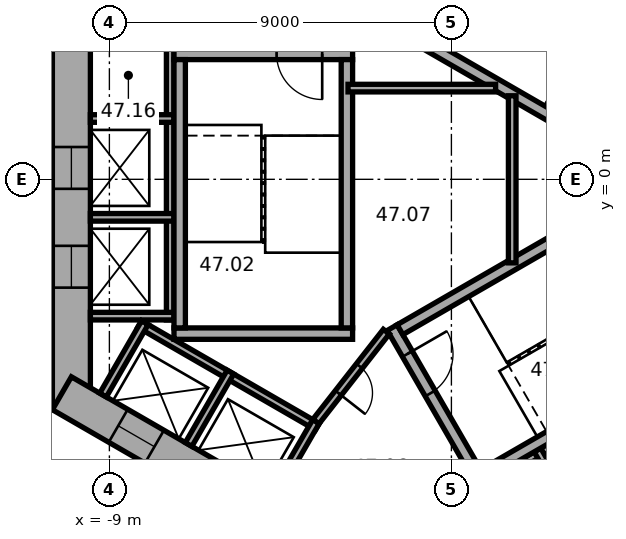
"""IFC4 building model, lengths in metres.
Left out: names, types, materials, properties, quantities, classifications, styles, units other than length and angle.
Written with IfcOpenShell. Run it as: python <this file> out.ifc"""

import sys

from ifc_helpers import new_model, si_unit, direction, frame, frame_2d, origin, place, context, subcontext, project, spatial, rectangle, extrude, element, fill, save


model = new_model("IFC4")
c1 = context("Model", 3, precision=1e-05, world=origin(), true_north=direction((0.0, 1.0)))
c2 = subcontext(c1, "Body", "Model", "MODEL_VIEW")
j1 = project(units=[si_unit("LENGTHUNIT", "METRE"), si_unit("PLANEANGLEUNIT", "RADIAN")], contexts=[c1])
p1 = place(None, origin())
s1 = spatial("IfcSite", under=j1, at=p1, CompositionType="ELEMENT")
p2 = place(p1, origin())
s2 = spatial("IfcBuilding", under=s1, at=p2, CompositionType="ELEMENT")
p3 = place(p2, frame((0.0, 0.0, 191.0)))
s3 = spatial("IfcBuildingStorey", under=s2, at=p3, CompositionType="ELEMENT", Elevation=191.0)
p4 = place(p3, frame((-10.0, 6.062, 0.0), z_axis=(0.0, 0.0, 1.0), x_axis=(0.0, -1.0, 0.0)))
e1 = element("IfcWall", 1, at=p4, inside=s3, PredefinedType="SHEAR", context=c2, shape_type="SweptSolid", body=[
    extrude(rectangle(XDim=12.125, YDim=1.0, at=frame_2d((6.062, 0.0))), origin(), (0.0, 0.0, 1.0), 3.7),
])
p5 = place(p4, frame((5.212, 0.0, 0.0)))
e2 = element("IfcOpeningElement", 2, at=p5, cuts=e1, PredefinedType="OPENING", context=c2, shape_type="SweptSolid", body=[
    extrude(rectangle(XDim=1.1, YDim=2.1, at=frame_2d((0.55, 1.05))), frame((0.0, 0.51, 0.0), z_axis=(0.0, -1.0, 0.0), x_axis=(1.0, 0.0, 0.0)), (0.0, 0.0, 1.0), 1.02),
])
p6 = place(p4, frame((7.812, 0.0, 0.0)))
e3 = element("IfcOpeningElement", 3, at=p6, cuts=e1, PredefinedType="OPENING", context=c2, shape_type="SweptSolid", body=[
    extrude(rectangle(XDim=1.1, YDim=2.1, at=frame_2d((0.55, 1.05))), frame((0.0, 0.51, 0.0), z_axis=(0.0, -1.0, 0.0), x_axis=(1.0, 0.0, 0.0)), (0.0, 0.0, 1.0), 1.02),
])
p7 = place(p3, frame((-10.25, -5.629, 0.0), z_axis=(0.0, 0.0, 1.0), x_axis=(0.866022616891, -0.50000482701, 0.0)))
e4 = element("IfcWall", 4, at=p7, inside=s3, PredefinedType="SHEAR", context=c2, shape_type="SweptSolid", body=[
    extrude(rectangle(XDim=12.125, YDim=1.0, at=frame_2d((6.062, 0.0))), origin(), (0.0, 0.0, 1.0), 3.7),
])
p8 = place(p7, frame((6.262, 0.0, 0.0)))
e5 = element("IfcOpeningElement", 5, at=p8, cuts=e4, PredefinedType="OPENING", context=c2, shape_type="SweptSolid", body=[
    extrude(rectangle(XDim=1.5, YDim=2.1, at=frame_2d((0.75, 1.05))), frame((0.0, 0.51, 0.0), z_axis=(0.0, -1.0, 0.0), x_axis=(1.0, 0.0, 0.0)), (0.0, 0.0, 1.0), 1.02),
])
p9 = place(p7, frame((1.712, 0.0, 0.0)))
e6 = element("IfcOpeningElement", 6, at=p9, cuts=e4, PredefinedType="OPENING", context=c2, shape_type="SweptSolid", body=[
    extrude(rectangle(XDim=1.1, YDim=2.1, at=frame_2d((0.55, 1.05))), frame((0.0, 0.51, 0.0), z_axis=(0.0, -1.0, 0.0), x_axis=(1.0, 0.0, 0.0)), (0.0, 0.0, 1.0), 1.02),
])
p10 = place(p7, frame((4.312, 0.0, 0.0)))
e7 = element("IfcOpeningElement", 7, at=p10, cuts=e4, PredefinedType="OPENING", context=c2, shape_type="SweptSolid", body=[
    extrude(rectangle(XDim=1.1, YDim=2.1, at=frame_2d((0.55, 1.05))), frame((0.0, 0.51, 0.0), z_axis=(0.0, -1.0, 0.0), x_axis=(1.0, 0.0, 0.0)), (0.0, 0.0, 1.0), 1.02),
])
p11 = place(p3, frame((-0.25, -11.691, 0.0), z_axis=(0.0, 0.0, 1.0), x_axis=(0.866022616891, 0.50000482701, 0.0)))
e8 = element("IfcWall", 8, at=p11, inside=s3, PredefinedType="SHEAR", context=c2, shape_type="SweptSolid", body=[
    extrude(rectangle(XDim=12.125, YDim=1.0, at=frame_2d((6.062, 0.0))), origin(), (0.0, 0.0, 1.0), 3.7),
])
p12 = place(p11, frame((2.612, 0.0, 0.0)))
e9 = element("IfcOpeningElement", 9, at=p12, cuts=e8, PredefinedType="OPENING", context=c2, shape_type="SweptSolid", body=[
    extrude(rectangle(XDim=1.1, YDim=2.1, at=frame_2d((0.55, 1.05))), frame((0.0, 0.51, 0.0), z_axis=(0.0, -1.0, 0.0), x_axis=(1.0, 0.0, 0.0)), (0.0, 0.0, 1.0), 1.02),
])
p13 = place(p11, frame((5.212, 0.0, 0.0)))
e10 = element("IfcOpeningElement", 10, at=p13, cuts=e8, PredefinedType="OPENING", context=c2, shape_type="SweptSolid", body=[
    extrude(rectangle(XDim=1.1, YDim=2.1, at=frame_2d((0.55, 1.05))), frame((0.0, 0.51, 0.0), z_axis=(0.0, -1.0, 0.0), x_axis=(1.0, 0.0, 0.0)), (0.0, 0.0, 1.0), 1.02),
])
p14 = place(p11, frame((7.812, 0.0, 0.0)))
e11 = element("IfcOpeningElement", 11, at=p14, cuts=e8, PredefinedType="OPENING", context=c2, shape_type="SweptSolid", body=[
    extrude(rectangle(XDim=1.1, YDim=2.1, at=frame_2d((0.55, 1.05))), frame((0.0, 0.51, 0.0), z_axis=(0.0, -1.0, 0.0), x_axis=(1.0, 0.0, 0.0)), (0.0, 0.0, 1.0), 1.02),
])
p15 = place(p3, frame((-7.4, 4.3, 0.0), z_axis=(0.0, 0.0, 1.0), x_axis=(0.0, -1.0, 0.0)))
e12 = element("IfcWall", 12, at=p15, inside=s3, PredefinedType="PARTITIONING", context=c2, shape_type="SweptSolid", body=[
    extrude(rectangle(XDim=8.0, YDim=0.2, at=frame_2d((4.0, 0.0))), origin(), (0.0, 0.0, 1.0), 3.42),
])
for number, where, z_axis, x_axis in (
    (13, (-7.3, 1.6, 0.0), (0.0, 0.0, 1.0), (-1.0, 0.0, 0.0)),
    (14, (-7.3, -1.0, 0.0), (0.0, 0.0, 1.0), (-1.0, 0.0, 0.0)),
    (15, (-7.3, -3.6, 0.0), (0.0, 0.0, 1.0), (-1.0, 0.0, 0.0)),
):
    element("IfcWall", number, at=place(p3, frame(where, z_axis=z_axis, x_axis=x_axis)), inside=s3, PredefinedType="PARTITIONING", context=c2, shape_type="SweptSolid", body=[
        extrude(rectangle(XDim=2.2, YDim=0.2, at=frame_2d((1.1, 0.0))), origin(), (0.0, 0.0, 1.0), 3.42),
    ])
p16 = place(p3, frame((-8.203, -3.809, 0.0), z_axis=(0.0, 0.0, 1.0), x_axis=(0.866028230842, -0.499995103361, 0.0)))
e16 = element("IfcWall", 16, at=p16, inside=s3, PredefinedType="PARTITIONING", context=c2, shape_type="SweptSolid", body=[
    extrude(rectangle(XDim=5.4, YDim=0.2, at=frame_2d((2.7, 0.0))), origin(), (0.0, 0.0, 1.0), 3.42),
])
for number, where, z_axis, x_axis in (
    (17, (-8.067, -3.772, 0.0), (0.0, 0.0, 1.0), (-0.5, -0.866, 0.0)),
    (18, (-5.815, -5.072, 0.0), (0.0, 0.0, 1.0), (-0.5, -0.866, 0.0)),
):
    element("IfcWall", number, at=place(p3, frame(where, z_axis=z_axis, x_axis=x_axis)), inside=s3, PredefinedType="PARTITIONING", context=c2, shape_type="SweptSolid", body=[
        extrude(rectangle(XDim=2.2, YDim=0.2, at=frame_2d((1.1, 0.0))), origin(), (0.0, 0.0, 1.0), 3.42),
    ])
p17 = place(p3, frame((-3.563, -6.372, 0.0), z_axis=(0.0, 0.0, 1.0), x_axis=(-0.499994660107, -0.866028486751, 0.0)))
e19 = element("IfcWall", 19, at=p17, inside=s3, PredefinedType="PARTITIONING", context=c2, shape_type="SweptSolid", body=[
    extrude(rectangle(XDim=2.2, YDim=0.2, at=frame_2d((1.1, 0.0))), origin(), (0.0, 0.0, 1.0), 3.42),
])
p18 = place(p3, frame((-0.024, -8.559, 0.0), z_axis=(0.0, 0.0, 1.0), x_axis=(0.866026010844, 0.49999894854, 0.0)))
e20 = element("IfcWall", 20, at=p18, inside=s3, PredefinedType="PARTITIONING", context=c2, shape_type="SweptSolid", body=[
    extrude(rectangle(XDim=8.0, YDim=0.2, at=frame_2d((4.0, 0.0))), origin(), (0.0, 0.0, 1.0), 3.42),
])
p19 = place(p3, frame((2.264, -7.122, 0.0), z_axis=(0.0, 0.0, 1.0), x_axis=(0.500077893725, -0.86598042715, 0.0)))
e21 = element("IfcWall", 21, at=p19, inside=s3, PredefinedType="PARTITIONING", context=c2, shape_type="SweptSolid", body=[
    extrude(rectangle(XDim=2.2, YDim=0.2, at=frame_2d((1.1, 0.0))), origin(), (0.0, 0.0, 1.0), 3.42),
])
p20 = place(p3, frame((4.103, 0.807, 0.0), z_axis=(0.0, 0.0, 1.0), x_axis=(-0.866027801685, 0.499995846692, 0.0)))
e22 = element("IfcWall", 22, at=p20, inside=s3, PredefinedType="SHEAR", context=c2, shape_type="SweptSolid", body=[
    extrude(rectangle(XDim=7.06, YDim=0.3, at=frame_2d((3.53, 0.0))), origin(), (0.0, 0.0, 1.0), 3.42),
])
p21 = place(p3, frame((-2.6, 3.3, 0.0), z_axis=(0.0, 0.0, 1.0), x_axis=(-1.0, 0.0, 0.0)))
e23 = element("IfcWall", 23, at=p21, inside=s3, PredefinedType="SHEAR", context=c2, shape_type="SweptSolid", body=[
    extrude(rectangle(XDim=4.7, YDim=0.3, at=frame_2d((2.35, 0.0))), origin(), (0.0, 0.0, 1.0), 3.42),
])
p22 = place(p21, frame((0.8, 0.0, 0.0)))
e24 = element("IfcOpeningElement", 24, at=p22, cuts=e23, PredefinedType="OPENING", context=c2, shape_type="SweptSolid", body=[
    extrude(rectangle(XDim=1.2, YDim=2.1, at=frame_2d((0.6, 1.05))), frame((0.0, 0.16, 0.0), z_axis=(0.0, -1.0, 0.0), x_axis=(1.0, 0.0, 0.0)), (0.0, 0.0, 1.0), 0.32),
])
p23 = place(p3, frame((-2.6, -4.06, 0.0), z_axis=(0.0, 0.0, 1.0), x_axis=(-1.0, 0.0, 0.0)))
e25 = element("IfcWall", 25, at=p23, inside=s3, PredefinedType="SHEAR", context=c2, shape_type="SweptSolid", body=[
    extrude(rectangle(XDim=4.7, YDim=0.3, at=frame_2d((2.35, 0.0))), origin(), (0.0, 0.0, 1.0), 3.42),
])
for number, where, z_axis, x_axis in (
    (26, (-2.75, 3.15, 0.0), (0.0, 0.0, 1.0), (0.0, -1.0, 0.0)),
    (27, (-7.15, 3.15, 0.0), (0.0, 0.0, 1.0), (0.0, -1.0, 0.0)),
):
    element("IfcWall", number, at=place(p3, frame(where, z_axis=z_axis, x_axis=x_axis)), inside=s3, PredefinedType="SHEAR", context=c2, shape_type="SweptSolid", body=[
        extrude(rectangle(XDim=7.06, YDim=0.3, at=frame_2d((3.53, 0.0))), origin(), (0.0, 0.0, 1.0), 3.42),
    ])
p24 = place(p3, frame((-1.558, -3.902, 0.0), z_axis=(0.0, 0.0, 1.0), x_axis=(0.499977259774, -0.866038532462, 0.0)))
e28 = element("IfcWall", 28, at=p24, inside=s3, PredefinedType="SHEAR", context=c2, shape_type="SweptSolid", body=[
    extrude(rectangle(XDim=4.7, YDim=0.3, at=frame_2d((2.35, 0.0))), origin(), (0.0, 0.0, 1.0), 3.42),
])
p25 = place(p24, frame((0.8, 0.0, 0.0)))
e29 = element("IfcOpeningElement", 29, at=p25, cuts=e28, PredefinedType="OPENING", context=c2, shape_type="SweptSolid", body=[
    extrude(rectangle(XDim=1.2, YDim=2.1, at=frame_2d((0.6, 1.05))), frame((0.0, 0.16, 0.0), z_axis=(0.0, -1.0, 0.0), x_axis=(1.0, 0.0, 0.0)), (0.0, 0.0, 1.0), 0.32),
])
for number, where, z_axis, x_axis in (
    (30, (-1.353, -3.957, 0.0), (0.0, 0.0, 1.0), (0.866, 0.5, 0.0)),
    (31, (0.847, -7.767, 0.0), (0.0, 0.0, 1.0), (0.866, 0.5, 0.0)),
):
    element("IfcWall", number, at=place(p3, frame(where, z_axis=z_axis, x_axis=x_axis)), inside=s3, PredefinedType="SHEAR", context=c2, shape_type="SweptSolid", body=[
        extrude(rectangle(XDim=7.06, YDim=0.3, at=frame_2d((3.53, 0.0))), origin(), (0.0, 0.0, 1.0), 3.42),
    ])
p26 = place(p3, frame((-1.712, -4.008, 0.0), z_axis=(0.0, 0.0, 1.0), x_axis=(-0.616549420702, -0.787316208287, 0.0)))
e32 = element("IfcWall", 32, at=p26, inside=s3, PredefinedType="PARTITIONING", context=c2, shape_type="SweptSolid", body=[
    extrude(rectangle(XDim=3.002, YDim=0.2, at=frame_2d((1.501, 0.0))), origin(), (0.0, 0.0, 1.0), 3.42),
])
p27 = place(p26, frame((1.15, 0.0, 0.0)))
e33 = element("IfcOpeningElement", 33, at=p27, cuts=e32, PredefinedType="OPENING", context=c2, shape_type="SweptSolid", body=[
    extrude(rectangle(XDim=0.9, YDim=2.1, at=frame_2d((0.45, 1.05))), frame((0.0, 0.11, 0.0), z_axis=(0.0, -1.0, 0.0), x_axis=(1.0, 0.0, 0.0)), (0.0, 0.0, 1.0), 0.22),
])
p28 = place(p3, frame((-2.72, 2.4, 0.0), z_axis=(0.0, 0.0, 1.0), x_axis=(1.0, 0.0, 0.0)))
e34 = element("IfcWall", 34, at=p28, inside=s3, PredefinedType="PARTITIONING", context=c2, shape_type="SweptSolid", body=[
    extrude(rectangle(XDim=3.883, YDim=0.2, at=frame_2d((1.941, 0.0))), origin(), (0.0, 0.0, 1.0), 3.42),
])
p29 = place(p3, frame((1.6, -2.198, 0.0), z_axis=(0.0, 0.0, 1.0), x_axis=(0.0, 1.0, 0.0)))
e35 = element("IfcWall", 35, at=p29, inside=s3, PredefinedType="PARTITIONING", context=c2, shape_type="SweptSolid", body=[
    extrude(rectangle(XDim=4.397, YDim=0.2, at=frame_2d((2.198, 0.0))), origin(), (0.0, 0.0, 1.0), 3.42),
])
p30 = place(p22, origin())
e36 = element("IfcDoor", 36, at=p30, inside=s3, OperationType="SINGLE_SWING_RIGHT", PredefinedType="DOOR", context=c2, shape_type="SweptSolid", body=[
    extrude(rectangle(XDim=1.2, YDim=2.1, at=frame_2d((0.6, 1.05))), frame((0.0, 0.025, 0.0), z_axis=(0.0, -1.0, 0.0), x_axis=(1.0, 0.0, 0.0)), (0.0, 0.0, 1.0), 0.05),
])
fill(e24, e36)
p31 = place(p25, origin())
e37 = element("IfcDoor", 37, at=p31, inside=s3, OperationType="SINGLE_SWING_RIGHT", PredefinedType="DOOR", context=c2, shape_type="SweptSolid", body=[
    extrude(rectangle(XDim=1.2, YDim=2.1, at=frame_2d((0.6, 1.05))), frame((0.0, 0.025, 0.0), z_axis=(0.0, -1.0, 0.0), x_axis=(1.0, 0.0, 0.0)), (0.0, 0.0, 1.0), 0.05),
])
fill(e29, e37)
p32 = place(p27, origin())
e38 = element("IfcDoor", 38, at=p32, inside=s3, OperationType="SINGLE_SWING_LEFT", PredefinedType="DOOR", context=c2, shape_type="SweptSolid", body=[
    extrude(rectangle(XDim=0.9, YDim=2.1, at=frame_2d((0.45, 1.05))), frame((0.0, 0.025, 0.0), z_axis=(0.0, -1.0, 0.0), x_axis=(1.0, 0.0, 0.0)), (0.0, 0.0, 1.0), 0.05),
])
fill(e33, e38)
p33 = place(p5, origin())
e39 = element("IfcDoor", 39, at=p33, inside=s3, OperationType="DOUBLE_DOOR_SLIDING", PredefinedType="DOOR", context=c2, shape_type="SweptSolid", body=[
    extrude(rectangle(XDim=1.1, YDim=2.1, at=frame_2d((0.55, 1.05))), frame((0.0, 0.025, 0.0), z_axis=(0.0, -1.0, 0.0), x_axis=(1.0, 0.0, 0.0)), (0.0, 0.0, 1.0), 0.05),
])
fill(e2, e39)
p34 = place(p6, origin())
e40 = element("IfcDoor", 40, at=p34, inside=s3, OperationType="DOUBLE_DOOR_SLIDING", PredefinedType="DOOR", context=c2, shape_type="SweptSolid", body=[
    extrude(rectangle(XDim=1.1, YDim=2.1, at=frame_2d((0.55, 1.05))), frame((0.0, 0.025, 0.0), z_axis=(0.0, -1.0, 0.0), x_axis=(1.0, 0.0, 0.0)), (0.0, 0.0, 1.0), 0.05),
])
fill(e3, e40)
p35 = place(p9, origin())
e41 = element("IfcDoor", 41, at=p35, inside=s3, OperationType="DOUBLE_DOOR_SLIDING", PredefinedType="DOOR", context=c2, shape_type="SweptSolid", body=[
    extrude(rectangle(XDim=1.1, YDim=2.1, at=frame_2d((0.55, 1.05))), frame((0.0, 0.025, 0.0), z_axis=(0.0, -1.0, 0.0), x_axis=(1.0, 0.0, 0.0)), (0.0, 0.0, 1.0), 0.05),
])
fill(e6, e41)
save(model, sys.argv[1])
